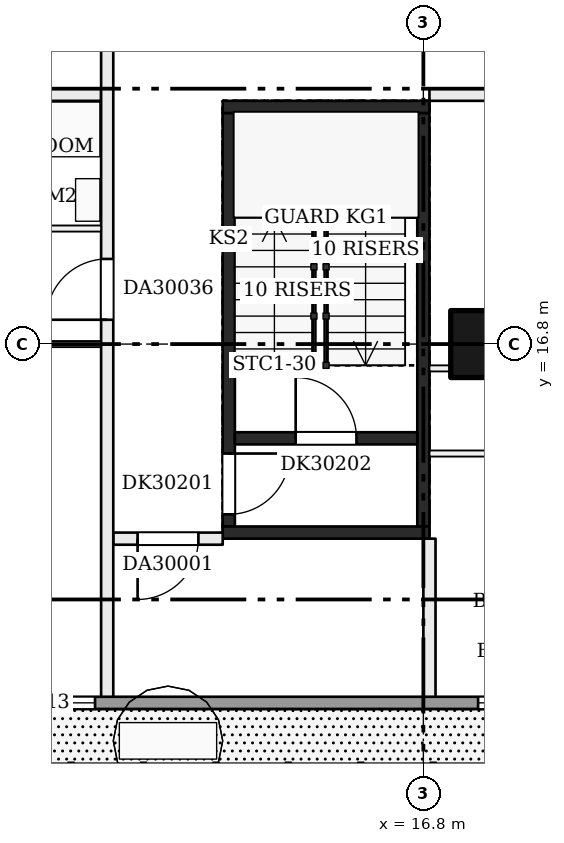
"""IFC4 building model, lengths in metres.
Left out: names, types, materials, properties, quantities, classifications, styles, units other than length and angle.
Written with IfcOpenShell. Run it as: python <this file> out.ifc"""

import sys

from ifc_helpers import new_model, si_unit, direction, frame, frame_2d, origin, origin_2d, place, context, subcontext, project, spatial, rectangle, extrude, element, fill, save


model = new_model("IFC4")
c1 = context("Model", 3, precision=1e-05, world=origin(), true_north=direction((0.0, 1.0)))
c2 = subcontext(c1, "Body", "Model", "MODEL_VIEW")
j1 = project(units=[si_unit("LENGTHUNIT", "METRE"), si_unit("PLANEANGLEUNIT", "RADIAN")], contexts=[c1])
p1 = place(None, origin())
s1 = spatial("IfcSite", under=j1, at=p1, CompositionType="ELEMENT")
p2 = place(p1, origin())
s2 = spatial("IfcBuilding", under=s1, at=p2, CompositionType="ELEMENT")
p3 = place(p2, frame((0.0, 0.0, 119.7)))
s3 = spatial("IfcBuildingStorey", under=s2, at=p3, CompositionType="ELEMENT", Elevation=119.7)
p4 = place(p3, frame((17.8, 16.8, 0.0), z_axis=(0.0, 0.0, 1.0), x_axis=(1.0, 0.0, 0.0)))
e1 = element("IfcColumn", 1, at=p4, inside=s3, PredefinedType="COLUMN", context=c2, shape_type="SweptSolid", body=[
    extrude(rectangle(XDim=1.1, YDim=1.1, at=origin_2d()), origin(), (0.0, 0.0, 1.0), 3.22),
])
p5 = place(p3, frame((13.6, 13.8, 0.0), z_axis=(0.0, 0.0, 1.0), x_axis=(0.0, 1.0, 0.0)))
e2 = element("IfcWall", 2, at=p5, inside=s3, PredefinedType="SHEAR", context=c2, shape_type="SweptSolid", body=[
    extrude(rectangle(XDim=6.8, YDim=0.2, at=frame_2d((3.4, 0.0))), origin(), (0.0, 0.0, 1.0), 3.22),
])
p6 = place(p5, frame((0.2, 0.0, 0.0)))
e3 = element("IfcOpeningElement", 3, at=p6, cuts=e2, PredefinedType="OPENING", context=c2, shape_type="SweptSolid", body=[
    extrude(rectangle(XDim=1.0, YDim=2.1, at=frame_2d((0.5, 1.05))), frame((0.0, 0.11, 0.0), z_axis=(0.0, -1.0, 0.0), x_axis=(1.0, 0.0, 0.0)), (0.0, 0.0, 1.0), 0.22),
])
p7 = place(p3, frame((16.8, 13.8, 0.0), z_axis=(0.0, 0.0, 1.0), x_axis=(0.0, 1.0, 0.0)))
e4 = element("IfcWall", 4, at=p7, inside=s3, PredefinedType="SHEAR", context=c2, shape_type="SweptSolid", body=[
    extrude(rectangle(XDim=6.8, YDim=0.2, at=frame_2d((3.4, 0.0))), origin(), (0.0, 0.0, 1.0), 3.22),
])
for number, where, z_axis, x_axis in (
    (5, (13.5, 13.7, 0.0), (0.0, 0.0, 1.0), (1.0, 0.0, 0.0)),
    (6, (13.5, 20.7, 0.0), (0.0, 0.0, 1.0), (1.0, 0.0, 0.0)),
):
    element("IfcWall", number, at=place(p3, frame(where, z_axis=z_axis, x_axis=x_axis)), inside=s3, PredefinedType="SHEAR", context=c2, shape_type="SweptSolid", body=[
        extrude(rectangle(XDim=3.4, YDim=0.2, at=frame_2d((1.7, 0.0))), origin(), (0.0, 0.0, 1.0), 3.22),
    ])
p8 = place(p3, frame((13.7, 15.25, 0.0), z_axis=(0.0, 0.0, 1.0), x_axis=(1.0, 0.0, 0.0)))
e7 = element("IfcWall", 7, at=p8, inside=s3, PredefinedType="SHEAR", context=c2, shape_type="SweptSolid", body=[
    extrude(rectangle(XDim=3.0, YDim=0.2, at=frame_2d((1.5, 0.0))), origin(), (0.0, 0.0, 1.0), 3.22),
])
p9 = place(p8, frame((1.0, 0.0, 0.0)))
e8 = element("IfcOpeningElement", 8, at=p9, cuts=e7, PredefinedType="OPENING", context=c2, shape_type="SweptSolid", body=[
    extrude(rectangle(XDim=1.0, YDim=2.1, at=frame_2d((0.5, 1.05))), frame((0.0, 0.11, 0.0), z_axis=(0.0, -1.0, 0.0), x_axis=(1.0, 0.0, 0.0)), (0.0, 0.0, 1.0), 0.22),
])
p10 = place(p3, frame((11.7, 13.6, 0.0), z_axis=(0.0, 0.0, 1.0), x_axis=(1.0, 0.0, 0.0)))
e9 = element("IfcWall", 9, at=p10, inside=s3, PredefinedType="PARTITIONING", context=c2, shape_type="SweptSolid", body=[
    extrude(rectangle(XDim=1.8, YDim=0.2, at=frame_2d((0.9, 0.0))), origin(), (0.0, 0.0, 1.0), 3.22),
])
p11 = place(p10, frame((0.4, 0.0, 0.0)))
e10 = element("IfcOpeningElement", 10, at=p11, cuts=e9, PredefinedType="OPENING", context=c2, shape_type="SweptSolid", body=[
    extrude(rectangle(XDim=1.0, YDim=2.1, at=frame_2d((0.5, 1.05))), frame((0.0, 0.11, 0.0), z_axis=(0.0, -1.0, 0.0), x_axis=(1.0, 0.0, 0.0)), (0.0, 0.0, 1.0), 0.22),
])
p12 = place(p3, frame((16.9, 15.0, 0.0), z_axis=(0.0, 0.0, 1.0), x_axis=(1.0, 0.0, 0.0)))
e11 = element("IfcWall", 11, at=p12, inside=s3, PredefinedType="PARTITIONING", context=c2, shape_type="SweptSolid", body=[
    extrude(rectangle(XDim=23.1, YDim=0.1, at=frame_2d((11.55, 0.0))), origin(), (0.0, 0.0, 1.0), 3.22),
])
p13 = place(p12, frame((1.6, 0.0, 0.0)))
e12 = element("IfcOpeningElement", 12, at=p13, cuts=e11, PredefinedType="OPENING", context=c2, shape_type="SweptSolid", body=[
    extrude(rectangle(XDim=0.9, YDim=2.1, at=frame_2d((0.45, 1.05))), frame((0.0, 0.06, 0.0), z_axis=(0.0, -1.0, 0.0), x_axis=(1.0, 0.0, 0.0)), (0.0, 0.0, 1.0), 0.12),
])
p14 = place(p12, frame((5.8, 0.0, 0.0)))
e13 = element("IfcOpeningElement", 13, at=p14, cuts=e11, PredefinedType="OPENING", context=c2, shape_type="SweptSolid", body=[
    extrude(rectangle(XDim=0.9, YDim=2.1, at=frame_2d((0.45, 1.05))), frame((0.0, 0.06, 0.0), z_axis=(0.0, -1.0, 0.0), x_axis=(1.0, 0.0, 0.0)), (0.0, 0.0, 1.0), 0.12),
])
p15 = place(p12, frame((9.9, 0.0, 0.0)))
e14 = element("IfcOpeningElement", 14, at=p15, cuts=e11, PredefinedType="OPENING", context=c2, shape_type="SweptSolid", body=[
    extrude(rectangle(XDim=0.9, YDim=2.1, at=frame_2d((0.45, 1.05))), frame((0.0, 0.06, 0.0), z_axis=(0.0, -1.0, 0.0), x_axis=(1.0, 0.0, 0.0)), (0.0, 0.0, 1.0), 0.12),
])
p16 = place(p12, frame((14.1, 0.0, 0.0)))
e15 = element("IfcOpeningElement", 15, at=p16, cuts=e11, PredefinedType="OPENING", context=c2, shape_type="SweptSolid", body=[
    extrude(rectangle(XDim=0.9, YDim=2.1, at=frame_2d((0.45, 1.05))), frame((0.0, 0.06, 0.0), z_axis=(0.0, -1.0, 0.0), x_axis=(1.0, 0.0, 0.0)), (0.0, 0.0, 1.0), 0.12),
])
p17 = place(p12, frame((19.5, 0.0, 0.0)))
e16 = element("IfcOpeningElement", 16, at=p17, cuts=e11, PredefinedType="OPENING", context=c2, shape_type="SweptSolid", body=[
    extrude(rectangle(XDim=0.9, YDim=2.1, at=frame_2d((0.45, 1.05))), frame((0.0, 0.06, 0.0), z_axis=(0.0, -1.0, 0.0), x_axis=(1.0, 0.0, 0.0)), (0.0, 0.0, 1.0), 0.12),
])
p18 = place(p3, frame((16.9, 16.4, 0.0), z_axis=(0.0, 0.0, 1.0), x_axis=(1.0, 0.0, 0.0)))
e17 = element("IfcWall", 17, at=p18, inside=s3, PredefinedType="PARTITIONING", context=c2, shape_type="SweptSolid", body=[
    extrude(rectangle(XDim=23.1, YDim=0.1, at=frame_2d((11.55, 0.0))), origin(), (0.0, 0.0, 1.0), 3.22),
])
p19 = place(p18, frame((6.629, 0.0, 0.0)))
e18 = element("IfcOpeningElement", 18, at=p19, cuts=e17, PredefinedType="OPENING", context=c2, shape_type="SweptSolid", body=[
    extrude(rectangle(XDim=0.9, YDim=2.1, at=frame_2d((0.45, 1.05))), frame((0.0, 0.06, 0.0), z_axis=(0.0, -1.0, 0.0), x_axis=(1.0, 0.0, 0.0)), (0.0, 0.0, 1.0), 0.12),
])
p20 = place(p18, frame((1.7, 0.0, 0.0)))
e19 = element("IfcOpeningElement", 19, at=p20, cuts=e17, PredefinedType="OPENING", context=c2, shape_type="SweptSolid", body=[
    extrude(rectangle(XDim=0.9, YDim=2.1, at=frame_2d((0.45, 1.05))), frame((0.0, 0.06, 0.0), z_axis=(0.0, -1.0, 0.0), x_axis=(1.0, 0.0, 0.0)), (0.0, 0.0, 1.0), 0.12),
])
p21 = place(p18, frame((4.214, 0.0, 0.0)))
e20 = element("IfcOpeningElement", 20, at=p21, cuts=e17, PredefinedType="OPENING", context=c2, shape_type="SweptSolid", body=[
    extrude(rectangle(XDim=0.9, YDim=2.1, at=frame_2d((0.45, 1.05))), frame((0.0, 0.06, 0.0), z_axis=(0.0, -1.0, 0.0), x_axis=(1.0, 0.0, 0.0)), (0.0, 0.0, 1.0), 0.12),
])
p22 = place(p18, frame((10.743, 0.0, 0.0)))
e21 = element("IfcOpeningElement", 21, at=p22, cuts=e17, PredefinedType="OPENING", context=c2, shape_type="SweptSolid", body=[
    extrude(rectangle(XDim=0.9, YDim=2.1, at=frame_2d((0.45, 1.05))), frame((0.0, 0.06, 0.0), z_axis=(0.0, -1.0, 0.0), x_axis=(1.0, 0.0, 0.0)), (0.0, 0.0, 1.0), 0.12),
])
p23 = place(p18, frame((13.957, 0.0, 0.0)))
e22 = element("IfcOpeningElement", 22, at=p23, cuts=e17, PredefinedType="OPENING", context=c2, shape_type="SweptSolid", body=[
    extrude(rectangle(XDim=0.9, YDim=2.1, at=frame_2d((0.45, 1.05))), frame((0.0, 0.06, 0.0), z_axis=(0.0, -1.0, 0.0), x_axis=(1.0, 0.0, 0.0)), (0.0, 0.0, 1.0), 0.12),
])
p24 = place(p18, frame((17.472, 0.0, 0.0)))
e23 = element("IfcOpeningElement", 23, at=p24, cuts=e17, PredefinedType="OPENING", context=c2, shape_type="SweptSolid", body=[
    extrude(rectangle(XDim=0.9, YDim=2.1, at=frame_2d((0.45, 1.05))), frame((0.0, 0.06, 0.0), z_axis=(0.0, -1.0, 0.0), x_axis=(1.0, 0.0, 0.0)), (0.0, 0.0, 1.0), 0.12),
])
p25 = place(p18, frame((20.986, 0.0, 0.0)))
e24 = element("IfcOpeningElement", 24, at=p25, cuts=e17, PredefinedType="OPENING", context=c2, shape_type="SweptSolid", body=[
    extrude(rectangle(XDim=0.9, YDim=2.1, at=frame_2d((0.45, 1.05))), frame((0.0, 0.06, 0.0), z_axis=(0.0, -1.0, 0.0), x_axis=(1.0, 0.0, 0.0)), (0.0, 0.0, 1.0), 0.12),
])
p26 = place(p3, frame((9.0, 16.8, 0.0), z_axis=(0.0, 0.0, 1.0), x_axis=(1.0, 0.0, 0.0)))
e25 = element("IfcWall", 25, at=p26, inside=s3, PredefinedType="PARTITIONING", context=c2, shape_type="SweptSolid", body=[
    extrude(rectangle(XDim=2.5, YDim=0.1, at=frame_2d((1.25, 0.0))), origin(), (0.0, 0.0, 1.0), 3.22),
])
p27 = place(p26, frame((0.4, 0.0, 0.0)))
e26 = element("IfcOpeningElement", 26, at=p27, cuts=e25, PredefinedType="OPENING", context=c2, shape_type="SweptSolid", body=[
    extrude(rectangle(XDim=0.9, YDim=2.1, at=frame_2d((0.45, 1.05))), frame((0.0, 0.06, 0.0), z_axis=(0.0, -1.0, 0.0), x_axis=(1.0, 0.0, 0.0)), (0.0, 0.0, 1.0), 0.12),
])
p28 = place(p3, frame((8.05, 18.7, 0.0), z_axis=(0.0, 0.0, 1.0), x_axis=(1.0, 0.0, 0.0)))
e27 = element("IfcWall", 27, at=p28, inside=s3, PredefinedType="PARTITIONING", context=c2, shape_type="SweptSolid", body=[
    extrude(rectangle(XDim=3.45, YDim=0.1, at=frame_2d((1.725, 0.0))), origin(), (0.0, 0.0, 1.0), 3.22),
])
p29 = place(p3, frame((2.5, 20.9, 0.0), z_axis=(0.0, 0.0, 1.0), x_axis=(1.0, 0.0, 0.0)))
e28 = element("IfcWall", 28, at=p29, inside=s3, PredefinedType="PARTITIONING", context=c2, shape_type="SweptSolid", body=[
    extrude(rectangle(XDim=9.0, YDim=0.2, at=frame_2d((4.5, 0.0))), origin(), (0.0, 0.0, 1.0), 3.22),
])
p30 = place(p3, frame((16.9, 20.9, 0.0), z_axis=(0.0, 0.0, 1.0), x_axis=(1.0, 0.0, 0.0)))
e29 = element("IfcWall", 29, at=p30, inside=s3, PredefinedType="PARTITIONING", context=c2, shape_type="SweptSolid", body=[
    extrude(rectangle(XDim=23.3, YDim=0.2, at=frame_2d((11.65, 0.0))), origin(), (0.0, 0.0, 1.0), 3.22),
])
p31 = place(p30, frame((7.629, 0.0, 0.0)))
e30 = element("IfcOpeningElement", 30, at=p31, cuts=e29, PredefinedType="OPENING", context=c2, shape_type="SweptSolid", body=[
    extrude(rectangle(XDim=1.0, YDim=2.1, at=frame_2d((0.5, 1.05))), frame((0.0, 0.11, 0.0), z_axis=(0.0, -1.0, 0.0), x_axis=(1.0, 0.0, 0.0)), (0.0, 0.0, 1.0), 0.22),
])
p32 = place(p3, frame((11.6, 10.9, 0.0), z_axis=(0.0, 0.0, 1.0), x_axis=(0.0, 1.0, 0.0)))
e31 = element("IfcWall", 31, at=p32, inside=s3, PredefinedType="PARTITIONING", context=c2, shape_type="SweptSolid", body=[
    extrude(rectangle(XDim=31.1, YDim=0.2, at=frame_2d((15.55, 0.0))), origin(), (0.0, 0.0, 1.0), 3.22),
])
p33 = place(p32, frame((6.3, 0.0, 0.0)))
e32 = element("IfcOpeningElement", 32, at=p33, cuts=e31, PredefinedType="OPENING", context=c2, shape_type="SweptSolid", body=[
    extrude(rectangle(XDim=1.0, YDim=2.1, at=frame_2d((0.5, 1.05))), frame((0.0, 0.11, 0.0), z_axis=(0.0, -1.0, 0.0), x_axis=(1.0, 0.0, 0.0)), (0.0, 0.0, 1.0), 0.22),
])
p34 = place(p32, frame((11.0, 0.0, 0.0)))
e33 = element("IfcOpeningElement", 33, at=p34, cuts=e31, PredefinedType="OPENING", context=c2, shape_type="SweptSolid", body=[
    extrude(rectangle(XDim=1.0, YDim=2.1, at=frame_2d((0.5, 1.05))), frame((0.0, 0.11, 0.0), z_axis=(0.0, -1.0, 0.0), x_axis=(1.0, 0.0, 0.0)), (0.0, 0.0, 1.0), 0.22),
])
p35 = place(p3, frame((16.9, 10.9, 0.0), z_axis=(0.0, 0.0, 1.0), x_axis=(0.0, 1.0, 0.0)))
e34 = element("IfcWall", 34, at=p35, inside=s3, PredefinedType="PARTITIONING", context=c2, shape_type="SweptSolid", body=[
    extrude(rectangle(XDim=2.7, YDim=0.2, at=frame_2d((1.35, 0.0))), origin(), (0.0, 0.0, 1.0), 3.22),
])
p36 = place(p3, frame((4.8, 10.9, 0.0), z_axis=(0.0, 0.0, 1.0), x_axis=(1.0, 0.0, 0.0)))
e35 = element("IfcWall", 35, at=p36, inside=s3, PredefinedType="SOLIDWALL", context=c2, shape_type="SweptSolid", body=[
    extrude(rectangle(XDim=37.2, YDim=0.2, at=frame_2d((18.6, 0.0))), origin(), (0.0, 0.0, 1.0), 3.22),
])
p37 = place(p36, frame((0.3, 0.0, 0.9)))
e36 = element("IfcOpeningElement", 36, at=p37, cuts=e35, PredefinedType="OPENING", context=c2, shape_type="SweptSolid", body=[
    extrude(rectangle(XDim=2.4, YDim=1.5, at=frame_2d((1.2, 0.75))), frame((0.0, 0.11, 0.0), z_axis=(0.0, -1.0, 0.0), x_axis=(1.0, 0.0, 0.0)), (0.0, 0.0, 1.0), 0.22),
])
p38 = place(p36, frame((4.2, 0.0, 0.9)))
e37 = element("IfcOpeningElement", 37, at=p38, cuts=e35, PredefinedType="OPENING", context=c2, shape_type="SweptSolid", body=[
    extrude(rectangle(XDim=2.4, YDim=1.5, at=frame_2d((1.2, 0.75))), frame((0.0, 0.11, 0.0), z_axis=(0.0, -1.0, 0.0), x_axis=(1.0, 0.0, 0.0)), (0.0, 0.0, 1.0), 0.22),
])
p39 = place(p36, frame((12.9, 0.0, 0.9)))
e38 = element("IfcOpeningElement", 38, at=p39, cuts=e35, PredefinedType="OPENING", context=c2, shape_type="SweptSolid", body=[
    extrude(rectangle(XDim=2.4, YDim=1.5, at=frame_2d((1.2, 0.75))), frame((0.0, 0.11, 0.0), z_axis=(0.0, -1.0, 0.0), x_axis=(1.0, 0.0, 0.0)), (0.0, 0.0, 1.0), 0.22),
])
p40 = place(p36, frame((17.1, 0.0, 0.9)))
e39 = element("IfcOpeningElement", 39, at=p40, cuts=e35, PredefinedType="OPENING", context=c2, shape_type="SweptSolid", body=[
    extrude(rectangle(XDim=2.4, YDim=1.5, at=frame_2d((1.2, 0.75))), frame((0.0, 0.11, 0.0), z_axis=(0.0, -1.0, 0.0), x_axis=(1.0, 0.0, 0.0)), (0.0, 0.0, 1.0), 0.22),
])
p41 = place(p36, frame((21.3, 0.0, 0.0)))
e40 = element("IfcOpeningElement", 40, at=p41, cuts=e35, PredefinedType="OPENING", context=c2, shape_type="SweptSolid", body=[
    extrude(rectangle(XDim=2.4, YDim=2.2, at=frame_2d((1.2, 1.1))), frame((0.0, 0.11, 0.0), z_axis=(0.0, -1.0, 0.0), x_axis=(1.0, 0.0, 0.0)), (0.0, 0.0, 1.0), 0.22),
])
p42 = place(p36, frame((25.5, 0.0, 0.9)))
e41 = element("IfcOpeningElement", 41, at=p42, cuts=e35, PredefinedType="OPENING", context=c2, shape_type="SweptSolid", body=[
    extrude(rectangle(XDim=2.4, YDim=1.5, at=frame_2d((1.2, 0.75))), frame((0.0, 0.11, 0.0), z_axis=(0.0, -1.0, 0.0), x_axis=(1.0, 0.0, 0.0)), (0.0, 0.0, 1.0), 0.22),
])
p43 = place(p36, frame((29.7, 0.0, 0.9)))
e42 = element("IfcOpeningElement", 42, at=p43, cuts=e35, PredefinedType="OPENING", context=c2, shape_type="SweptSolid", body=[
    extrude(rectangle(XDim=2.4, YDim=1.5, at=frame_2d((1.2, 0.75))), frame((0.0, 0.11, 0.0), z_axis=(0.0, -1.0, 0.0), x_axis=(1.0, 0.0, 0.0)), (0.0, 0.0, 1.0), 0.22),
])
p44 = place(p36, frame((33.9, 0.0, 0.9)))
e43 = element("IfcOpeningElement", 43, at=p44, cuts=e35, PredefinedType="OPENING", context=c2, shape_type="SweptSolid", body=[
    extrude(rectangle(XDim=1.3, YDim=1.5, at=frame_2d((0.65, 0.75))), frame((0.0, 0.11, 0.0), z_axis=(0.0, -1.0, 0.0), x_axis=(1.0, 0.0, 0.0)), (0.0, 0.0, 1.0), 0.22),
])
p45 = place(p6, frame((1.0, 0.0, 0.0), z_axis=(0.0, 0.0, 1.0), x_axis=(-1.0, 0.0, 0.0)))
e44 = element("IfcDoor", 44, at=p45, inside=s3, OperationType="SINGLE_SWING_LEFT", PredefinedType="DOOR", context=c2, shape_type="SweptSolid", body=[
    extrude(rectangle(XDim=1.0, YDim=2.1, at=frame_2d((0.5, 1.05))), frame((0.0, 0.025, 0.0), z_axis=(0.0, -1.0, 0.0), x_axis=(1.0, 0.0, 0.0)), (0.0, 0.0, 1.0), 0.05),
])
fill(e3, e44)
p46 = place(p9, origin())
e45 = element("IfcDoor", 45, at=p46, inside=s3, OperationType="SINGLE_SWING_LEFT", PredefinedType="DOOR", context=c2, shape_type="SweptSolid", body=[
    extrude(rectangle(XDim=1.0, YDim=2.1, at=frame_2d((0.5, 1.05))), frame((0.0, 0.025, 0.0), z_axis=(0.0, -1.0, 0.0), x_axis=(1.0, 0.0, 0.0)), (0.0, 0.0, 1.0), 0.05),
])
fill(e8, e45)
p47 = place(p11, frame((1.0, 0.0, 0.0), z_axis=(0.0, 0.0, 1.0), x_axis=(-1.0, 0.0, 0.0)))
e46 = element("IfcDoor", 46, at=p47, inside=s3, OperationType="SINGLE_SWING_RIGHT", PredefinedType="DOOR", context=c2, shape_type="SweptSolid", body=[
    extrude(rectangle(XDim=1.0, YDim=2.1, at=frame_2d((0.5, 1.05))), frame((0.0, 0.025, 0.0), z_axis=(0.0, -1.0, 0.0), x_axis=(1.0, 0.0, 0.0)), (0.0, 0.0, 1.0), 0.05),
])
fill(e10, e46)
p48 = place(p33, origin())
e47 = element("IfcDoor", 47, at=p48, inside=s3, OperationType="SINGLE_SWING_LEFT", PredefinedType="DOOR", context=c2, shape_type="SweptSolid", body=[
    extrude(rectangle(XDim=1.0, YDim=2.1, at=frame_2d((0.5, 1.05))), frame((0.0, 0.025, 0.0), z_axis=(0.0, -1.0, 0.0), x_axis=(1.0, 0.0, 0.0)), (0.0, 0.0, 1.0), 0.05),
])
fill(e32, e47)
p49 = place(p38, origin())
e48 = element("IfcWindow", 48, at=p49, inside=s3, PartitioningType="SINGLE_PANEL", PredefinedType="WINDOW", context=c2, shape_type="SweptSolid", body=[
    extrude(rectangle(XDim=2.4, YDim=1.5, at=frame_2d((1.2, 0.75))), frame((0.0, 0.03, 0.0), z_axis=(0.0, -1.0, 0.0), x_axis=(1.0, 0.0, 0.0)), (0.0, 0.0, 1.0), 0.06),
])
fill(e37, e48)
p50 = place(p39, origin())
e49 = element("IfcWindow", 49, at=p50, inside=s3, PartitioningType="SINGLE_PANEL", PredefinedType="WINDOW", context=c2, shape_type="SweptSolid", body=[
    extrude(rectangle(XDim=2.4, YDim=1.5, at=frame_2d((1.2, 0.75))), frame((0.0, 0.03, 0.0), z_axis=(0.0, -1.0, 0.0), x_axis=(1.0, 0.0, 0.0)), (0.0, 0.0, 1.0), 0.06),
])
fill(e38, e49)
save(model, sys.argv[1])
